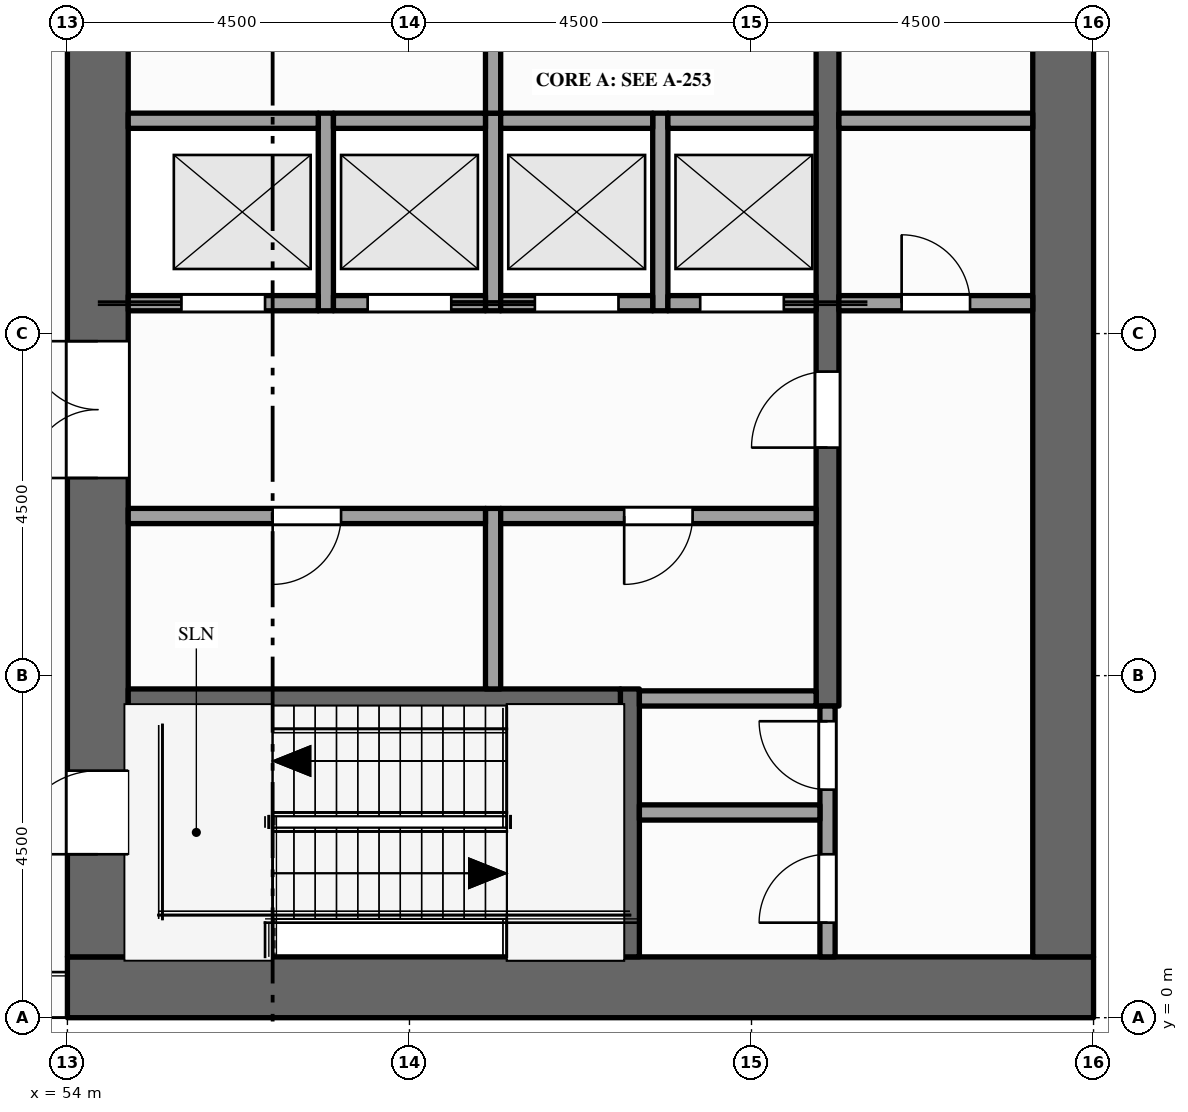
"""IFC4 building model, lengths in metres.
Left out: names, types, materials, properties, quantities, classifications, styles, units other than length and angle.
Written with IfcOpenShell. Run it as: python <this file> out.ifc"""

import sys

from ifc_helpers import new_model, si_unit, direction, frame, frame_2d, origin, place, context, subcontext, project, spatial, rectangle, extrude, element, fill, save


model = new_model("IFC4")
c1 = context("Model", 3, precision=1e-05, world=origin(), true_north=direction((0.0, 1.0)))
c2 = subcontext(c1, "Body", "Model", "MODEL_VIEW")
j1 = project(units=[si_unit("LENGTHUNIT", "METRE"), si_unit("PLANEANGLEUNIT", "RADIAN")], contexts=[c1])
p1 = place(None, origin())
s1 = spatial("IfcSite", under=j1, at=p1, CompositionType="ELEMENT")
p2 = place(p1, origin())
s2 = spatial("IfcBuilding", under=s1, at=p2, CompositionType="ELEMENT")
p3 = place(p2, frame((0.0, 0.0, 297.0)))
s3 = spatial("IfcBuildingStorey", under=s2, at=p3, CompositionType="ELEMENT", Elevation=297.0)
p4 = place(p3, frame((67.5, 0.4, -0.15), z_axis=(0.0, 0.0, 1.0), x_axis=(-1.0, 0.0, 0.0)))
e1 = element("IfcWall", 1, at=p4, inside=s3, PredefinedType="SHEAR", context=c2, shape_type="SweptSolid", body=[
    extrude(rectangle(XDim=13.5, YDim=0.8, at=frame_2d((6.75, 0.0))), origin(), (0.0, 0.0, 1.0), 8.0),
])
p5 = place(p3, frame((54.4, 0.8, -0.15), z_axis=(0.0, 0.0, 1.0), x_axis=(0.0, 1.0, 0.0)))
e2 = element("IfcWall", 2, at=p5, inside=s3, PredefinedType="SHEAR", context=c2, shape_type="SweptSolid", body=[
    extrude(rectangle(XDim=20.9, YDim=0.8, at=frame_2d((10.45, 0.0))), origin(), (0.0, 0.0, 1.0), 8.0),
])
p6 = place(p5, frame((6.3, 0.0, 0.15)))
e3 = element("IfcOpeningElement", 3, at=p6, cuts=e2, PredefinedType="OPENING", context=c2, shape_type="SweptSolid", body=[
    extrude(rectangle(XDim=1.8, YDim=2.1, at=frame_2d((0.9, 1.05))), frame((0.0, 0.41, 0.0), z_axis=(0.0, -1.0, 0.0), x_axis=(1.0, 0.0, 0.0)), (0.0, 0.0, 1.0), 0.82),
])
p7 = place(p5, frame((12.35, 0.0, 0.15)))
e4 = element("IfcOpeningElement", 4, at=p7, cuts=e2, PredefinedType="OPENING", context=c2, shape_type="SweptSolid", body=[
    extrude(rectangle(XDim=1.1, YDim=2.1, at=frame_2d((0.55, 1.05))), frame((0.0, 0.41, 0.0), z_axis=(0.0, -1.0, 0.0), x_axis=(1.0, 0.0, 0.0)), (0.0, 0.0, 1.0), 0.82),
])
p8 = place(p5, frame((1.35, 0.0, 0.15)))
e5 = element("IfcOpeningElement", 5, at=p8, cuts=e2, PredefinedType="OPENING", context=c2, shape_type="SweptSolid", body=[
    extrude(rectangle(XDim=1.1, YDim=2.1, at=frame_2d((0.55, 1.05))), frame((0.0, 0.41, 0.0), z_axis=(0.0, -1.0, 0.0), x_axis=(1.0, 0.0, 0.0)), (0.0, 0.0, 1.0), 0.82),
])
p9 = place(p5, frame((18.55, 0.0, 0.15)))
e6 = element("IfcOpeningElement", 6, at=p9, cuts=e2, PredefinedType="OPENING", context=c2, shape_type="SweptSolid", body=[
    extrude(rectangle(XDim=1.1, YDim=2.1, at=frame_2d((0.55, 1.05))), frame((0.0, 0.41, 0.0), z_axis=(0.0, -1.0, 0.0), x_axis=(1.0, 0.0, 0.0)), (0.0, 0.0, 1.0), 0.82),
])
p10 = place(p3, frame((67.1, 0.8, -0.15), z_axis=(0.0, 0.0, 1.0), x_axis=(0.0, 1.0, 0.0)))
e7 = element("IfcWall", 7, at=p10, inside=s3, PredefinedType="SHEAR", context=c2, shape_type="SweptSolid", body=[
    extrude(rectangle(XDim=20.9, YDim=0.8, at=frame_2d((10.45, 0.0))), origin(), (0.0, 0.0, 1.0), 8.0),
])
p11 = place(p3, frame((57.4, 9.3, 0.0), z_axis=(0.0, 0.0, 1.0), x_axis=(0.0, 1.0, 0.0)))
e8 = element("IfcWall", 8, at=p11, inside=s3, PredefinedType="SOLIDWALL", context=c2, shape_type="SweptSolid", body=[
    extrude(rectangle(XDim=2.6, YDim=0.2, at=frame_2d((1.3, 0.0))), origin(), (0.0, 0.0, 1.0), 7.85),
])
p12 = place(p3, frame((59.6, 4.325, 0.0), z_axis=(0.0, 0.0, 1.0), x_axis=(0.0, 1.0, 0.0)))
e9 = element("IfcWall", 9, at=p12, inside=s3, PredefinedType="PARTITIONING", context=c2, shape_type="SweptSolid", body=[
    extrude(rectangle(XDim=2.375, YDim=0.2, at=frame_2d((1.188, 0.0))), origin(), (0.0, 0.0, 1.0), 7.85),
])
p13 = place(p3, frame((59.6, 9.3, 0.0), z_axis=(0.0, 0.0, 1.0), x_axis=(0.0, 1.0, 0.0)))
e10 = element("IfcWall", 10, at=p13, inside=s3, PredefinedType="SOLIDWALL", context=c2, shape_type="SweptSolid", body=[
    extrude(rectangle(XDim=2.6, YDim=0.2, at=frame_2d((1.3, 0.0))), origin(), (0.0, 0.0, 1.0), 7.85),
])
p14 = place(p3, frame((59.6, 11.9, 0.0), z_axis=(0.0, 0.0, 1.0), x_axis=(0.0, 1.0, 0.0)))
e11 = element("IfcWall", 11, at=p14, inside=s3, PredefinedType="PARTITIONING", context=c2, shape_type="SweptSolid", body=[
    extrude(rectangle(XDim=3.6, YDim=0.2, at=frame_2d((1.8, 0.0))), origin(), (0.0, 0.0, 1.0), 7.85),
])
p15 = place(p14, frame((1.3, 0.0, 0.0)))
e12 = element("IfcOpeningElement", 12, at=p15, cuts=e11, PredefinedType="OPENING", context=c2, shape_type="SweptSolid", body=[
    extrude(rectangle(XDim=1.0, YDim=2.1, at=frame_2d((0.5, 1.05))), frame((0.0, 0.11, 0.0), z_axis=(0.0, -1.0, 0.0), x_axis=(1.0, 0.0, 0.0)), (0.0, 0.0, 1.0), 0.22),
])
p16 = place(p3, frame((61.4, 0.8, 0.0), z_axis=(0.0, 0.0, 1.0), x_axis=(0.0, 1.0, 0.0)))
e13 = element("IfcWall", 13, at=p16, inside=s3, PredefinedType="SHEAR", context=c2, shape_type="SweptSolid", body=[
    extrude(rectangle(XDim=3.525, YDim=0.25, at=frame_2d((1.762, 0.0))), origin(), (0.0, 0.0, 1.0), 7.85),
])
p17 = place(p3, frame((61.8, 9.3, 0.0), z_axis=(0.0, 0.0, 1.0), x_axis=(0.0, 1.0, 0.0)))
e14 = element("IfcWall", 14, at=p17, inside=s3, PredefinedType="SOLIDWALL", context=c2, shape_type="SweptSolid", body=[
    extrude(rectangle(XDim=2.6, YDim=0.2, at=frame_2d((1.3, 0.0))), origin(), (0.0, 0.0, 1.0), 7.85),
])
p18 = place(p3, frame((64.0, 0.8, 0.0), z_axis=(0.0, 0.0, 1.0), x_axis=(0.0, 1.0, 0.0)))
e15 = element("IfcWall", 15, at=p18, inside=s3, PredefinedType="PARTITIONING", context=c2, shape_type="SweptSolid", body=[
    extrude(rectangle(XDim=3.3, YDim=0.2, at=frame_2d((1.65, 0.0))), origin(), (0.0, 0.0, 1.0), 7.85),
])
p19 = place(p18, frame((0.45, 0.0, 0.0)))
e16 = element("IfcOpeningElement", 16, at=p19, cuts=e15, PredefinedType="OPENING", context=c2, shape_type="SweptSolid", body=[
    extrude(rectangle(XDim=0.9, YDim=2.1, at=frame_2d((0.45, 1.05))), frame((0.0, 0.11, 0.0), z_axis=(0.0, -1.0, 0.0), x_axis=(1.0, 0.0, 0.0)), (0.0, 0.0, 1.0), 0.22),
])
p20 = place(p18, frame((2.2, 0.0, 0.0)))
e17 = element("IfcOpeningElement", 17, at=p20, cuts=e15, PredefinedType="OPENING", context=c2, shape_type="SweptSolid", body=[
    extrude(rectangle(XDim=0.9, YDim=2.1, at=frame_2d((0.45, 1.05))), frame((0.0, 0.11, 0.0), z_axis=(0.0, -1.0, 0.0), x_axis=(1.0, 0.0, 0.0)), (0.0, 0.0, 1.0), 0.22),
])
p21 = place(p3, frame((64.0, 4.1, 0.0), z_axis=(0.0, 0.0, 1.0), x_axis=(0.0, 1.0, 0.0)))
e18 = element("IfcWall", 18, at=p21, inside=s3, PredefinedType="SHEAR", context=c2, shape_type="SweptSolid", body=[
    extrude(rectangle(XDim=14.5, YDim=0.3, at=frame_2d((7.25, 0.0))), origin(), (0.0, 0.0, 1.0), 7.85),
])
p22 = place(p21, frame((3.4, 0.0, 0.0)))
e19 = element("IfcOpeningElement", 19, at=p22, cuts=e18, PredefinedType="OPENING", context=c2, shape_type="SweptSolid", body=[
    extrude(rectangle(XDim=1.0, YDim=2.1, at=frame_2d((0.5, 1.05))), frame((0.0, 0.16, 0.0), z_axis=(0.0, -1.0, 0.0), x_axis=(1.0, 0.0, 0.0)), (0.0, 0.0, 1.0), 0.32),
])
p23 = place(p21, frame((9.1, 0.0, 0.0)))
e20 = element("IfcOpeningElement", 20, at=p23, cuts=e18, PredefinedType="OPENING", context=c2, shape_type="SweptSolid", body=[
    extrude(rectangle(XDim=1.0, YDim=2.1, at=frame_2d((0.5, 1.05))), frame((0.0, 0.16, 0.0), z_axis=(0.0, -1.0, 0.0), x_axis=(1.0, 0.0, 0.0)), (0.0, 0.0, 1.0), 0.32),
])
p24 = place(p3, frame((61.525, 2.7, 0.0), z_axis=(0.0, 0.0, 1.0), x_axis=(1.0, 0.0, 0.0)))
e21 = element("IfcWall", 21, at=p24, inside=s3, PredefinedType="PARTITIONING", context=c2, shape_type="SweptSolid", body=[
    extrude(rectangle(XDim=2.375, YDim=0.2, at=frame_2d((1.188, 0.0))), origin(), (0.0, 0.0, 1.0), 7.85),
])
p25 = place(p3, frame((54.8, 4.2, 0.0), z_axis=(0.0, 0.0, 1.0), x_axis=(1.0, 0.0, 0.0)))
e22 = element("IfcWall", 22, at=p25, inside=s3, PredefinedType="SHEAR", context=c2, shape_type="SweptSolid", body=[
    extrude(rectangle(XDim=6.475, YDim=0.25, at=frame_2d((3.237, 0.0))), origin(), (0.0, 0.0, 1.0), 7.85),
])
p26 = place(p3, frame((61.525, 4.2, 0.0), z_axis=(0.0, 0.0, 1.0), x_axis=(1.0, 0.0, 0.0)))
e23 = element("IfcWall", 23, at=p26, inside=s3, PredefinedType="PARTITIONING", context=c2, shape_type="SweptSolid", body=[
    extrude(rectangle(XDim=2.325, YDim=0.2, at=frame_2d((1.163, 0.0))), origin(), (0.0, 0.0, 1.0), 7.85),
])
p27 = place(p3, frame((54.8, 6.6, 0.0), z_axis=(0.0, 0.0, 1.0), x_axis=(1.0, 0.0, 0.0)))
e24 = element("IfcWall", 24, at=p27, inside=s3, PredefinedType="PARTITIONING", context=c2, shape_type="SweptSolid", body=[
    extrude(rectangle(XDim=4.7, YDim=0.2, at=frame_2d((2.35, 0.0))), origin(), (0.0, 0.0, 1.0), 7.85),
])
p28 = place(p27, frame((1.9, 0.0, 0.0)))
e25 = element("IfcOpeningElement", 25, at=p28, cuts=e24, PredefinedType="OPENING", context=c2, shape_type="SweptSolid", body=[
    extrude(rectangle(XDim=0.9, YDim=2.1, at=frame_2d((0.45, 1.05))), frame((0.0, 0.11, 0.0), z_axis=(0.0, -1.0, 0.0), x_axis=(1.0, 0.0, 0.0)), (0.0, 0.0, 1.0), 0.22),
])
p29 = place(p3, frame((59.7, 6.6, 0.0), z_axis=(0.0, 0.0, 1.0), x_axis=(1.0, 0.0, 0.0)))
e26 = element("IfcWall", 26, at=p29, inside=s3, PredefinedType="PARTITIONING", context=c2, shape_type="SweptSolid", body=[
    extrude(rectangle(XDim=4.15, YDim=0.2, at=frame_2d((2.075, 0.0))), origin(), (0.0, 0.0, 1.0), 7.85),
])
p30 = place(p29, frame((1.625, 0.0, 0.0)))
e27 = element("IfcOpeningElement", 27, at=p30, cuts=e26, PredefinedType="OPENING", context=c2, shape_type="SweptSolid", body=[
    extrude(rectangle(XDim=0.9, YDim=2.1, at=frame_2d((0.45, 1.05))), frame((0.0, 0.11, 0.0), z_axis=(0.0, -1.0, 0.0), x_axis=(1.0, 0.0, 0.0)), (0.0, 0.0, 1.0), 0.22),
])
p31 = place(p3, frame((54.8, 9.4, 0.0), z_axis=(0.0, 0.0, 1.0), x_axis=(1.0, 0.0, 0.0)))
e28 = element("IfcWall", 28, at=p31, inside=s3, PredefinedType="SOLIDWALL", context=c2, shape_type="SweptSolid", body=[
    extrude(rectangle(XDim=2.5, YDim=0.2, at=frame_2d((1.25, 0.0))), origin(), (0.0, 0.0, 1.0), 7.85),
])
p32 = place(p31, frame((0.7, 0.0, 0.012)))
e29 = element("IfcOpeningElement", 29, at=p32, cuts=e28, PredefinedType="OPENING", context=c2, shape_type="SweptSolid", body=[
    extrude(rectangle(XDim=1.1, YDim=2.1, at=frame_2d((0.55, 1.05))), frame((0.0, 0.11, 0.0), z_axis=(0.0, -1.0, 0.0), x_axis=(1.0, 0.0, 0.0)), (0.0, 0.0, 1.0), 0.22),
])
p33 = place(p3, frame((57.5, 9.4, 0.0), z_axis=(0.0, 0.0, 1.0), x_axis=(1.0, 0.0, 0.0)))
e30 = element("IfcWall", 30, at=p33, inside=s3, PredefinedType="SOLIDWALL", context=c2, shape_type="SweptSolid", body=[
    extrude(rectangle(XDim=2.0, YDim=0.2, at=frame_2d((1.0, 0.0))), origin(), (0.0, 0.0, 1.0), 7.85),
])
p34 = place(p33, frame((0.45, 0.0, 0.012)))
e31 = element("IfcOpeningElement", 31, at=p34, cuts=e30, PredefinedType="OPENING", context=c2, shape_type="SweptSolid", body=[
    extrude(rectangle(XDim=1.1, YDim=2.1, at=frame_2d((0.55, 1.05))), frame((0.0, 0.11, 0.0), z_axis=(0.0, -1.0, 0.0), x_axis=(1.0, 0.0, 0.0)), (0.0, 0.0, 1.0), 0.22),
])
p35 = place(p3, frame((59.7, 9.4, 0.0), z_axis=(0.0, 0.0, 1.0), x_axis=(1.0, 0.0, 0.0)))
e32 = element("IfcWall", 32, at=p35, inside=s3, PredefinedType="SOLIDWALL", context=c2, shape_type="SweptSolid", body=[
    extrude(rectangle(XDim=2.0, YDim=0.2, at=frame_2d((1.0, 0.0))), origin(), (0.0, 0.0, 1.0), 7.85),
])
p36 = place(p35, frame((0.45, 0.0, 0.012)))
e33 = element("IfcOpeningElement", 33, at=p36, cuts=e32, PredefinedType="OPENING", context=c2, shape_type="SweptSolid", body=[
    extrude(rectangle(XDim=1.1, YDim=2.1, at=frame_2d((0.55, 1.05))), frame((0.0, 0.11, 0.0), z_axis=(0.0, -1.0, 0.0), x_axis=(1.0, 0.0, 0.0)), (0.0, 0.0, 1.0), 0.22),
])
p37 = place(p3, frame((61.9, 9.4, 0.0), z_axis=(0.0, 0.0, 1.0), x_axis=(1.0, 0.0, 0.0)))
e34 = element("IfcWall", 34, at=p37, inside=s3, PredefinedType="SOLIDWALL", context=c2, shape_type="SweptSolid", body=[
    extrude(rectangle(XDim=1.95, YDim=0.2, at=frame_2d((0.975, 0.0))), origin(), (0.0, 0.0, 1.0), 7.85),
])
p38 = place(p37, frame((0.425, 0.0, 0.012)))
e35 = element("IfcOpeningElement", 35, at=p38, cuts=e34, PredefinedType="OPENING", context=c2, shape_type="SweptSolid", body=[
    extrude(rectangle(XDim=1.1, YDim=2.1, at=frame_2d((0.55, 1.05))), frame((0.0, 0.11, 0.0), z_axis=(0.0, -1.0, 0.0), x_axis=(1.0, 0.0, 0.0)), (0.0, 0.0, 1.0), 0.22),
])
p39 = place(p3, frame((64.15, 9.4, 0.0), z_axis=(0.0, 0.0, 1.0), x_axis=(1.0, 0.0, 0.0)))
e36 = element("IfcWall", 36, at=p39, inside=s3, PredefinedType="PARTITIONING", context=c2, shape_type="SweptSolid", body=[
    extrude(rectangle(XDim=2.55, YDim=0.2, at=frame_2d((1.275, 0.0))), origin(), (0.0, 0.0, 1.0), 7.85),
])
p40 = place(p39, frame((0.825, 0.0, 0.0)))
e37 = element("IfcOpeningElement", 37, at=p40, cuts=e36, PredefinedType="OPENING", context=c2, shape_type="SweptSolid", body=[
    extrude(rectangle(XDim=0.9, YDim=2.1, at=frame_2d((0.45, 1.05))), frame((0.0, 0.11, 0.0), z_axis=(0.0, -1.0, 0.0), x_axis=(1.0, 0.0, 0.0)), (0.0, 0.0, 1.0), 0.22),
])
p41 = place(p3, frame((54.8, 11.8, 0.0), z_axis=(0.0, 0.0, 1.0), x_axis=(1.0, 0.0, 0.0)))
e38 = element("IfcWall", 38, at=p41, inside=s3, PredefinedType="SOLIDWALL", context=c2, shape_type="SweptSolid", body=[
    extrude(rectangle(XDim=2.5, YDim=0.2, at=frame_2d((1.25, 0.0))), origin(), (0.0, 0.0, 1.0), 7.85),
])
for number, where, z_axis, x_axis in (
    (39, (57.5, 11.8, 0.0), (0.0, 0.0, 1.0), (1.0, 0.0, 0.0)),
    (40, (59.7, 11.8, 0.0), (0.0, 0.0, 1.0), (1.0, 0.0, 0.0)),
):
    element("IfcWall", number, at=place(p3, frame(where, z_axis=z_axis, x_axis=x_axis)), inside=s3, PredefinedType="SOLIDWALL", context=c2, shape_type="SweptSolid", body=[
        extrude(rectangle(XDim=2.0, YDim=0.2, at=frame_2d((1.0, 0.0))), origin(), (0.0, 0.0, 1.0), 7.85),
    ])
p42 = place(p3, frame((61.9, 11.8, 0.0), z_axis=(0.0, 0.0, 1.0), x_axis=(1.0, 0.0, 0.0)))
e41 = element("IfcWall", 41, at=p42, inside=s3, PredefinedType="SOLIDWALL", context=c2, shape_type="SweptSolid", body=[
    extrude(rectangle(XDim=1.95, YDim=0.2, at=frame_2d((0.975, 0.0))), origin(), (0.0, 0.0, 1.0), 7.85),
])
p43 = place(p3, frame((64.15, 11.8, 0.0), z_axis=(0.0, 0.0, 1.0), x_axis=(1.0, 0.0, 0.0)))
e42 = element("IfcWall", 42, at=p43, inside=s3, PredefinedType="PARTITIONING", context=c2, shape_type="SweptSolid", body=[
    extrude(rectangle(XDim=2.55, YDim=0.2, at=frame_2d((1.275, 0.0))), origin(), (0.0, 0.0, 1.0), 7.85),
])
p44 = place(p32, origin())
e43 = element("IfcDoor", 43, at=p44, inside=s3, OperationType="SLIDING_TO_LEFT", PredefinedType="DOOR", context=c2, shape_type="SweptSolid", body=[
    extrude(rectangle(XDim=1.1, YDim=2.1, at=frame_2d((0.55, 1.05))), frame((0.0, 0.025, 0.0), z_axis=(0.0, -1.0, 0.0), x_axis=(1.0, 0.0, 0.0)), (0.0, 0.0, 1.0), 0.05),
])
fill(e29, e43)
p45 = place(p34, origin())
e44 = element("IfcDoor", 44, at=p45, inside=s3, OperationType="SLIDING_TO_RIGHT", PredefinedType="DOOR", context=c2, shape_type="SweptSolid", body=[
    extrude(rectangle(XDim=1.1, YDim=2.1, at=frame_2d((0.55, 1.05))), frame((0.0, 0.025, 0.0), z_axis=(0.0, -1.0, 0.0), x_axis=(1.0, 0.0, 0.0)), (0.0, 0.0, 1.0), 0.05),
])
fill(e31, e44)
p46 = place(p36, origin())
e45 = element("IfcDoor", 45, at=p46, inside=s3, OperationType="SLIDING_TO_LEFT", PredefinedType="DOOR", context=c2, shape_type="SweptSolid", body=[
    extrude(rectangle(XDim=1.1, YDim=2.1, at=frame_2d((0.55, 1.05))), frame((0.0, 0.025, 0.0), z_axis=(0.0, -1.0, 0.0), x_axis=(1.0, 0.0, 0.0)), (0.0, 0.0, 1.0), 0.05),
])
fill(e33, e45)
p47 = place(p38, origin())
e46 = element("IfcDoor", 46, at=p47, inside=s3, OperationType="SLIDING_TO_RIGHT", PredefinedType="DOOR", context=c2, shape_type="SweptSolid", body=[
    extrude(rectangle(XDim=1.1, YDim=2.1, at=frame_2d((0.55, 1.05))), frame((0.0, 0.025, 0.0), z_axis=(0.0, -1.0, 0.0), x_axis=(1.0, 0.0, 0.0)), (0.0, 0.0, 1.0), 0.05),
])
fill(e35, e46)
p48 = place(p6, origin())
e47 = element("IfcDoor", 47, at=p48, inside=s3, OperationType="DOUBLE_DOOR_SINGLE_SWING", PredefinedType="DOOR", context=c2, shape_type="SweptSolid", body=[
    extrude(rectangle(XDim=1.8, YDim=2.1, at=frame_2d((0.9, 1.05))), frame((0.0, 0.025, 0.0), z_axis=(0.0, -1.0, 0.0), x_axis=(1.0, 0.0, 0.0)), (0.0, 0.0, 1.0), 0.05),
])
fill(e3, e47)
p49 = place(p22, origin())
e48 = element("IfcDoor", 48, at=p49, inside=s3, OperationType="SINGLE_SWING_LEFT", PredefinedType="DOOR", context=c2, shape_type="SweptSolid", body=[
    extrude(rectangle(XDim=1.0, YDim=2.1, at=frame_2d((0.5, 1.05))), frame((0.0, 0.025, 0.0), z_axis=(0.0, -1.0, 0.0), x_axis=(1.0, 0.0, 0.0)), (0.0, 0.0, 1.0), 0.05),
])
fill(e19, e48)
p50 = place(p40, origin())
e49 = element("IfcDoor", 49, at=p50, inside=s3, OperationType="SINGLE_SWING_LEFT", PredefinedType="DOOR", context=c2, shape_type="SweptSolid", body=[
    extrude(rectangle(XDim=0.9, YDim=2.1, at=frame_2d((0.45, 1.05))), frame((0.0, 0.025, 0.0), z_axis=(0.0, -1.0, 0.0), x_axis=(1.0, 0.0, 0.0)), (0.0, 0.0, 1.0), 0.05),
])
fill(e37, e49)
p51 = place(p8, origin())
e50 = element("IfcDoor", 50, at=p51, inside=s3, OperationType="SINGLE_SWING_LEFT", PredefinedType="DOOR", context=c2, shape_type="SweptSolid", body=[
    extrude(rectangle(XDim=1.1, YDim=2.1, at=frame_2d((0.55, 1.05))), frame((0.0, 0.025, 0.0), z_axis=(0.0, -1.0, 0.0), x_axis=(1.0, 0.0, 0.0)), (0.0, 0.0, 1.0), 0.05),
])
fill(e5, e50)
p52 = place(p19, origin())
e51 = element("IfcDoor", 51, at=p52, inside=s3, OperationType="SINGLE_SWING_LEFT", PredefinedType="DOOR", context=c2, shape_type="SweptSolid", body=[
    extrude(rectangle(XDim=0.9, YDim=2.1, at=frame_2d((0.45, 1.05))), frame((0.0, 0.025, 0.0), z_axis=(0.0, -1.0, 0.0), x_axis=(1.0, 0.0, 0.0)), (0.0, 0.0, 1.0), 0.05),
])
fill(e16, e51)
p53 = place(p20, origin())
e52 = element("IfcDoor", 52, at=p53, inside=s3, OperationType="SINGLE_SWING_RIGHT", PredefinedType="DOOR", context=c2, shape_type="SweptSolid", body=[
    extrude(rectangle(XDim=0.9, YDim=2.1, at=frame_2d((0.45, 1.05))), frame((0.0, 0.025, 0.0), z_axis=(0.0, -1.0, 0.0), x_axis=(1.0, 0.0, 0.0)), (0.0, 0.0, 1.0), 0.05),
])
fill(e17, e52)
p54 = place(p28, origin())
e53 = element("IfcDoor", 53, at=p54, inside=s3, OperationType="SINGLE_SWING_LEFT", PredefinedType="DOOR", context=c2, shape_type="SweptSolid", body=[
    extrude(rectangle(XDim=0.9, YDim=2.1, at=frame_2d((0.45, 1.05))), frame((0.0, 0.025, 0.0), z_axis=(0.0, -1.0, 0.0), x_axis=(1.0, 0.0, 0.0)), (0.0, 0.0, 1.0), 0.05),
])
fill(e25, e53)
p55 = place(p30, origin())
e54 = element("IfcDoor", 54, at=p55, inside=s3, OperationType="SINGLE_SWING_LEFT", PredefinedType="DOOR", context=c2, shape_type="SweptSolid", body=[
    extrude(rectangle(XDim=0.9, YDim=2.1, at=frame_2d((0.45, 1.05))), frame((0.0, 0.025, 0.0), z_axis=(0.0, -1.0, 0.0), x_axis=(1.0, 0.0, 0.0)), (0.0, 0.0, 1.0), 0.05),
])
fill(e27, e54)
save(model, sys.argv[1])
